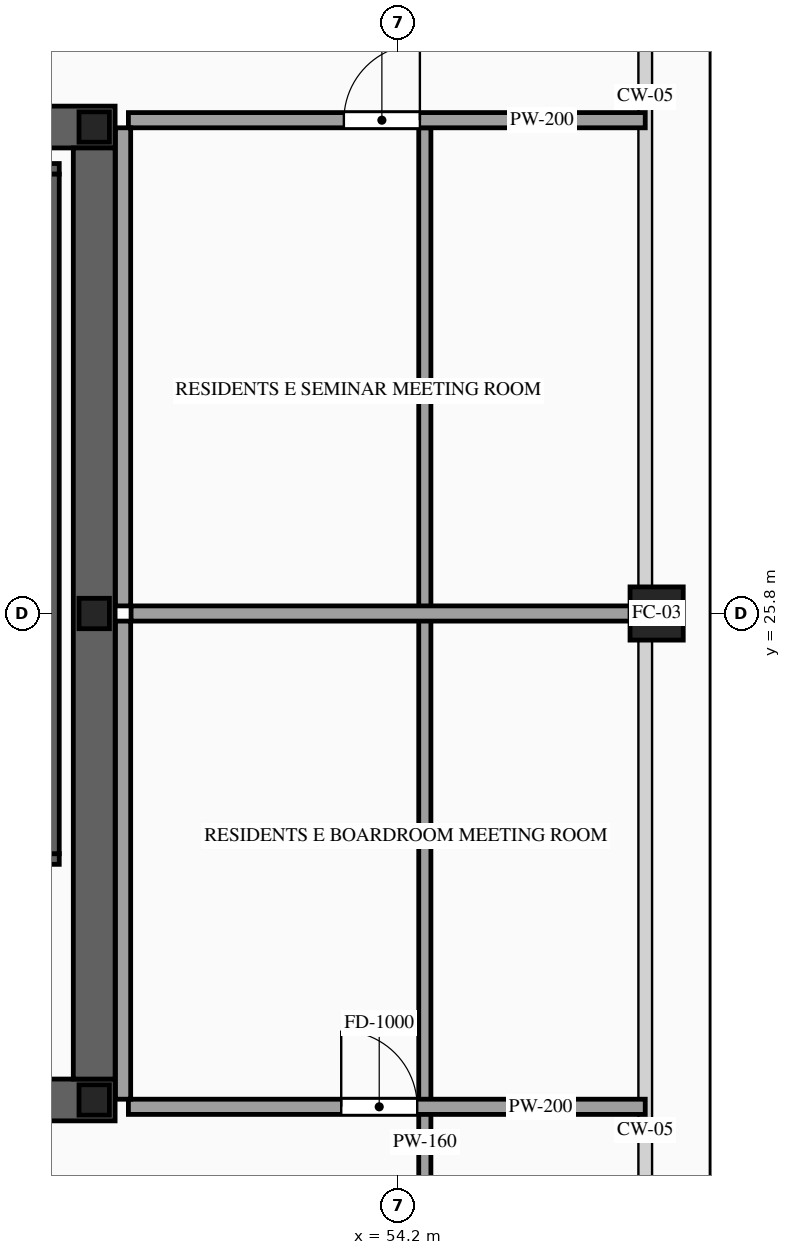
"""IFC4 building model, lengths in metres.
Left out: names, types, materials, properties, quantities, classifications, styles, units other than length and angle.
Written with IfcOpenShell. Run it as: python <this file> out.ifc"""

import sys

from ifc_helpers import new_model, si_unit, direction, frame, frame_2d, origin, origin_2d, place, context, subcontext, project, spatial, rectangle, hollow_rectangle, i_section, extrude, source, transform, mapped, element, fill, save


model = new_model("IFC4")
c1 = context("Model", 3, precision=1e-05, world=origin(), true_north=direction((0.0, 1.0)))
c2 = subcontext(c1, "Body", "Model", "MODEL_VIEW")
j1 = project(units=[si_unit("LENGTHUNIT", "METRE"), si_unit("PLANEANGLEUNIT", "RADIAN")], contexts=[c1])
p1 = place(None, origin())
s1 = spatial("IfcSite", under=j1, at=p1, CompositionType="ELEMENT")
p2 = place(p1, origin())
s2 = spatial("IfcBuilding", under=s1, at=p2, CompositionType="ELEMENT")
p3 = place(p2, frame((0.0, 0.0, 255.6)))
s3 = spatial("IfcBuildingStorey", under=s2, at=p3, CompositionType="ELEMENT", Elevation=255.6)
p4 = place(p3, frame((23.525, 19.4, 0.0), z_axis=(0.0, 0.0, 1.0), x_axis=(1.0, 0.0, 0.0)))
e1 = element("IfcWall", 1, at=p4, inside=s3, PredefinedType="SHEAR", context=c2, shape_type="SweptSolid", body=[
    extrude(rectangle(XDim=26.95, YDim=0.55, at=frame_2d((13.475, 0.0))), origin(), (0.0, 0.0, 1.0), 3.5),
])
p5 = place(p4, frame((1.925, 0.0, 0.0)))
e2 = element("IfcOpeningElement", 2, at=p5, cuts=e1, PredefinedType="OPENING", context=c2, shape_type="SweptSolid", body=[
    extrude(rectangle(XDim=1.1, YDim=2.2, at=frame_2d((0.55, 1.1))), frame((0.0, 0.29, 0.0), z_axis=(0.0, -1.0, 0.0), x_axis=(1.0, 0.0, 0.0)), (0.0, 0.0, 1.0), 0.58),
])
p6 = place(p4, frame((9.825, 0.0, 0.0)))
e3 = element("IfcOpeningElement", 3, at=p6, cuts=e1, PredefinedType="OPENING", context=c2, shape_type="SweptSolid", body=[
    extrude(rectangle(XDim=1.1, YDim=2.2, at=frame_2d((0.55, 1.1))), frame((0.0, 0.29, 0.0), z_axis=(0.0, -1.0, 0.0), x_axis=(1.0, 0.0, 0.0)), (0.0, 0.0, 1.0), 0.58),
])
p7 = place(p4, frame((23.025, 0.0, 0.0)))
e4 = element("IfcOpeningElement", 4, at=p7, cuts=e1, PredefinedType="OPENING", context=c2, shape_type="SweptSolid", body=[
    extrude(rectangle(XDim=1.1, YDim=2.2, at=frame_2d((0.55, 1.1))), frame((0.0, 0.29, 0.0), z_axis=(0.0, -1.0, 0.0), x_axis=(1.0, 0.0, 0.0)), (0.0, 0.0, 1.0), 0.58),
])
p8 = place(p4, frame((19.645, 0.0, 0.0)))
e5 = element("IfcOpeningElement", 5, at=p8, cuts=e1, PredefinedType="OPENING", context=c2, shape_type="SweptSolid", body=[
    extrude(rectangle(XDim=0.9, YDim=2.15, at=frame_2d((0.45, 1.075))), frame((0.0, 0.29, 0.0), z_axis=(0.0, -1.0, 0.0), x_axis=(1.0, 0.0, 0.0)), (0.0, 0.0, 1.0), 0.58),
])
p9 = place(p4, frame((18.205, 0.0, 0.0)))
e6 = element("IfcOpeningElement", 6, at=p9, cuts=e1, PredefinedType="OPENING", context=c2, shape_type="SweptSolid", body=[
    extrude(rectangle(XDim=0.9, YDim=2.15, at=frame_2d((0.45, 1.075))), frame((0.0, 0.29, 0.0), z_axis=(0.0, -1.0, 0.0), x_axis=(1.0, 0.0, 0.0)), (0.0, 0.0, 1.0), 0.58),
])
p10 = place(p3, frame((23.525, 32.2, 0.0), z_axis=(0.0, 0.0, 1.0), x_axis=(1.0, 0.0, 0.0)))
e7 = element("IfcWall", 7, at=p10, inside=s3, PredefinedType="SHEAR", context=c2, shape_type="SweptSolid", body=[
    extrude(rectangle(XDim=26.95, YDim=0.55, at=frame_2d((13.475, 0.0))), origin(), (0.0, 0.0, 1.0), 3.5),
])
p11 = place(p10, frame((4.545, 0.0, 0.0)))
e8 = element("IfcOpeningElement", 8, at=p11, cuts=e7, PredefinedType="OPENING", context=c2, shape_type="SweptSolid", body=[
    extrude(rectangle(XDim=0.9, YDim=2.15, at=frame_2d((0.45, 1.075))), frame((0.0, 0.29, 0.0), z_axis=(0.0, -1.0, 0.0), x_axis=(1.0, 0.0, 0.0)), (0.0, 0.0, 1.0), 0.58),
])
p12 = place(p10, frame((9.825, 0.0, 0.0)))
e9 = element("IfcOpeningElement", 9, at=p12, cuts=e7, PredefinedType="OPENING", context=c2, shape_type="SweptSolid", body=[
    extrude(rectangle(XDim=1.1, YDim=2.2, at=frame_2d((0.55, 1.1))), frame((0.0, 0.29, 0.0), z_axis=(0.0, -1.0, 0.0), x_axis=(1.0, 0.0, 0.0)), (0.0, 0.0, 1.0), 0.58),
])
p13 = place(p10, frame((15.675, 0.0, 0.0)))
e10 = element("IfcOpeningElement", 10, at=p13, cuts=e7, PredefinedType="OPENING", context=c2, shape_type="SweptSolid", body=[
    extrude(rectangle(XDim=1.1, YDim=2.2, at=frame_2d((0.55, 1.1))), frame((0.0, 0.29, 0.0), z_axis=(0.0, -1.0, 0.0), x_axis=(1.0, 0.0, 0.0)), (0.0, 0.0, 1.0), 0.58),
])
p14 = place(p10, frame((18.875, 0.0, 0.0)))
e11 = element("IfcOpeningElement", 11, at=p14, cuts=e7, PredefinedType="OPENING", context=c2, shape_type="SweptSolid", body=[
    extrude(rectangle(XDim=0.9, YDim=2.15, at=frame_2d((0.45, 1.075))), frame((0.0, 0.29, 0.0), z_axis=(0.0, -1.0, 0.0), x_axis=(1.0, 0.0, 0.0)), (0.0, 0.0, 1.0), 0.58),
])
m1 = source(origin(), c2, "Body", "SweptSolid", [
    extrude(rectangle(XDim=12.25, YDim=0.55, at=frame_2d((6.125, 0.0))), origin(), (0.0, 0.0, 1.0), 3.5),
])
p15 = place(p3, frame((50.2, 19.675, 0.0), z_axis=(0.0, 0.0, 1.0), x_axis=(0.0, 1.0, 0.0)))
e12 = element("IfcWall", 12, at=p15, inside=s3, PredefinedType="SHEAR", context=c2, shape_type="MappedRepresentation", body=[
    mapped(m1, transform((0.0, 0.0, 0.0), scale=1.0)),
])
m2 = source(origin(), c2, "Body", "SweptSolid", [
    extrude(i_section(OverallWidth=0.4, OverallDepth=0.4, WebThickness=0.013, FlangeThickness=0.021, at=origin_2d()), origin(), (0.0, 0.0, 1.0), 3.5),
])
for number, where, z_axis, x_axis in (
    (13, (50.2, 19.4, 0.0), (0.0, 0.0, 1.0), (1.0, 0.0, 0.0)),
    (14, (50.2, 25.8, 0.0), (0.0, 0.0, 1.0), (1.0, 0.0, 0.0)),
    (15, (50.2, 32.2, 0.0), (0.0, 0.0, 1.0), (1.0, 0.0, 0.0)),
):
    element("IfcColumn", number, at=place(p3, frame(where, z_axis=z_axis, x_axis=x_axis)), inside=s3, PredefinedType="COLUMN", context=c2, shape_type="MappedRepresentation", body=[
        mapped(m2, transform((0.0, 0.0, 0.0), scale=1.0)),
    ])
m3 = source(origin(), c2, "Body", "SweptSolid", [
    extrude(hollow_rectangle(XDim=0.7, YDim=0.7, WallThickness=0.032, at=origin_2d()), origin(), (0.0, 0.0, 1.0), 3.5),
])
p16 = place(p3, frame((57.6, 25.8, 0.0), z_axis=(0.0, 0.0, 1.0), x_axis=(1.0, 0.0, 0.0)))
e16 = element("IfcColumn", 16, at=p16, inside=s3, PredefinedType="COLUMN", context=c2, shape_type="MappedRepresentation", body=[
    mapped(m3, transform((0.0, 0.0, 0.0), scale=1.0)),
])
p17 = place(p3, frame((46.46, 22.57, 0.0), z_axis=(0.0, 0.0, 1.0), x_axis=(1.0, 0.0, 0.0)))
e17 = element("IfcWall", 17, at=p17, inside=s3, PredefinedType="SOLIDWALL", context=c2, shape_type="SweptSolid", body=[
    extrude(rectangle(XDim=3.28, YDim=0.14, at=frame_2d((1.64, 0.0))), origin(), (0.0, 0.0, 1.0), 3.2),
])
p18 = place(p17, frame((1.09, 0.0, 0.0)))
e18 = element("IfcOpeningElement", 18, at=p18, cuts=e17, PredefinedType="OPENING", context=c2, shape_type="SweptSolid", body=[
    extrude(rectangle(XDim=1.1, YDim=2.2, at=frame_2d((0.55, 1.1))), frame((0.0, 0.085, 0.0), z_axis=(0.0, -1.0, 0.0), x_axis=(1.0, 0.0, 0.0)), (0.0, 0.0, 1.0), 0.17),
])
m4 = source(origin(), c2, "Body", "SweptSolid", [
    extrude(rectangle(XDim=3.28, YDim=0.14, at=frame_2d((1.64, 0.0))), origin(), (0.0, 0.0, 1.0), 3.2),
])
p19 = place(p3, frame((46.46, 31.65, 0.0), z_axis=(0.0, 0.0, 1.0), x_axis=(1.0, 0.0, 0.0)))
e19 = element("IfcWall", 19, at=p19, inside=s3, PredefinedType="SOLIDWALL", context=c2, shape_type="MappedRepresentation", body=[
    mapped(m4, transform((0.0, 0.0, 0.0), scale=1.0)),
])
m5 = source(origin(), c2, "Body", "SweptSolid", [
    extrude(rectangle(XDim=8.94, YDim=0.14, at=frame_2d((4.47, 0.0))), origin(), (0.0, 0.0, 1.0), 3.2),
])
p20 = place(p3, frame((49.67, 22.64, 0.0), z_axis=(0.0, 0.0, 1.0), x_axis=(0.0, 1.0, 0.0)))
e20 = element("IfcWall", 20, at=p20, inside=s3, PredefinedType="SOLIDWALL", context=c2, shape_type="MappedRepresentation", body=[
    mapped(m5, transform((0.0, 0.0, 0.0), scale=1.0)),
])
m6 = source(origin(), c2, "Body", "SweptSolid", [
    extrude(rectangle(XDim=26.69, YDim=0.16, at=frame_2d((13.345, 0.0))), origin(), (0.0, 0.0, 1.0), 3.2),
])
p21 = place(p3, frame((54.55, 5.5, 0.0), z_axis=(0.0, 0.0, 1.0), x_axis=(0.0, 1.0, 0.0)))
e21 = element("IfcWall", 21, at=p21, inside=s3, PredefinedType="PARTITIONING", context=c2, shape_type="MappedRepresentation", body=[
    mapped(m6, transform((0.0, 0.0, 0.0), scale=1.0)),
])
p22 = place(p3, frame((50.65, 19.31, 0.0), z_axis=(0.0, 0.0, 1.0), x_axis=(1.0, 0.0, 0.0)))
e22 = element("IfcWall", 22, at=p22, inside=s3, PredefinedType="PARTITIONING", context=c2, shape_type="SweptSolid", body=[
    extrude(rectangle(XDim=6.8, YDim=0.2, at=frame_2d((3.4, 0.0))), origin(), (0.0, 0.0, 1.0), 2.745),
])
p23 = place(p22, frame((2.8, 0.0, 0.0)))
e23 = element("IfcOpeningElement", 23, at=p23, cuts=e22, PredefinedType="OPENING", context=c2, shape_type="SweptSolid", body=[
    extrude(rectangle(XDim=1.0, YDim=2.2, at=frame_2d((0.5, 1.1))), frame((0.0, 0.115, 0.0), z_axis=(0.0, -1.0, 0.0), x_axis=(1.0, 0.0, 0.0)), (0.0, 0.0, 1.0), 0.23),
])
m7 = source(origin(), c2, "Body", "SweptSolid", [
    extrude(rectangle(XDim=6.765, YDim=0.2, at=frame_2d((3.382, 0.0))), origin(), (0.0, 0.0, 1.0), 2.707),
])
p24 = place(p3, frame((50.685, 25.8, 0.0), z_axis=(0.0, 0.0, 1.0), x_axis=(1.0, 0.0, 0.0)))
e24 = element("IfcWall", 24, at=p24, inside=s3, PredefinedType="PARTITIONING", context=c2, shape_type="MappedRepresentation", body=[
    mapped(m7, transform((0.0, 0.0, 0.0), scale=1.0)),
])
m8 = source(origin(), c2, "Body", "SweptSolid", [
    extrude(rectangle(XDim=6.29, YDim=0.2, at=frame_2d((3.145, 0.0))), origin(), (0.0, 0.0, 1.0), 3.2),
])
p25 = place(p3, frame((50.58, 19.41, 0.0), z_axis=(0.0, 0.0, 1.0), x_axis=(0.0, 1.0, 0.0)))
e25 = element("IfcWall", 25, at=p25, inside=s3, PredefinedType="PARTITIONING", context=c2, shape_type="MappedRepresentation", body=[
    mapped(m8, transform((0.0, 0.0, 0.0), scale=1.0)),
])
p26 = place(p3, frame((50.65, 32.29, 0.0), z_axis=(0.0, 0.0, 1.0), x_axis=(1.0, 0.0, 0.0)))
e26 = element("IfcWall", 26, at=p26, inside=s3, PredefinedType="PARTITIONING", context=c2, shape_type="SweptSolid", body=[
    extrude(rectangle(XDim=6.8, YDim=0.2, at=frame_2d((3.4, 0.0))), origin(), (0.0, 0.0, 1.0), 2.745),
])
p27 = place(p26, frame((2.835, 0.0, 0.0)))
e27 = element("IfcOpeningElement", 27, at=p27, cuts=e26, PredefinedType="OPENING", context=c2, shape_type="SweptSolid", body=[
    extrude(rectangle(XDim=1.0, YDim=2.2, at=frame_2d((0.5, 1.1))), frame((0.0, 0.115, 0.0), z_axis=(0.0, -1.0, 0.0), x_axis=(1.0, 0.0, 0.0)), (0.0, 0.0, 1.0), 0.23),
])
p28 = place(p3, frame((50.58, 25.9, 0.0), z_axis=(0.0, 0.0, 1.0), x_axis=(0.0, 1.0, 0.0)))
e28 = element("IfcWall", 28, at=p28, inside=s3, PredefinedType="PARTITIONING", context=c2, shape_type="MappedRepresentation", body=[
    mapped(m8, transform((0.0, 0.0, 0.0), scale=1.0)),
])
m9 = source(origin(), c2, "Body", "SweptSolid", [
    extrude(rectangle(XDim=1.0, YDim=2.2, at=frame_2d((0.5, 1.1))), frame((0.0, 0.025, 0.0), z_axis=(0.0, -1.0, 0.0), x_axis=(1.0, 0.0, 0.0)), (0.0, 0.0, 1.0), 0.05),
])
p29 = place(p23, origin())
e29 = element("IfcDoor", 29, at=p29, inside=s3, OperationType="SINGLE_SWING_LEFT", PredefinedType="DOOR", context=c2, shape_type="MappedRepresentation", body=[
    mapped(m9, transform((0.0, 0.0, 0.0), scale=1.0)),
])
fill(e23, e29)
p30 = place(p27, origin())
e30 = element("IfcDoor", 30, at=p30, inside=s3, OperationType="SINGLE_SWING_RIGHT", PredefinedType="DOOR", context=c2, shape_type="MappedRepresentation", body=[
    mapped(m9, transform((0.0, 0.0, 0.0), scale=1.0)),
])
fill(e27, e30)
save(model, sys.argv[1])
